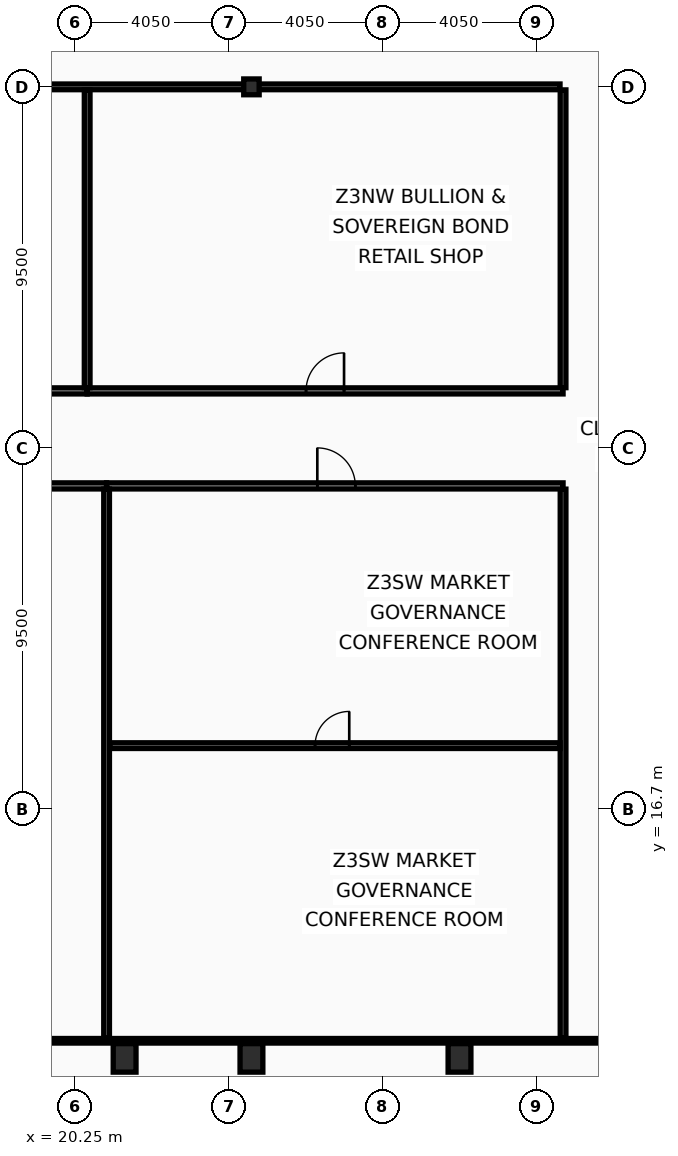
"""IFC4 building model, lengths in metres.
Left out: names, types, materials, properties, quantities, classifications, styles, units other than length and angle.
Written with IfcOpenShell. Run it as: python <this file> out.ifc"""

import sys

from ifc_helpers import new_model, si_unit, direction, frame, frame_2d, origin, origin_2d, place, context, subcontext, project, spatial, rectangle, hollow_rectangle, i_section, extrude, element, fill, save


model = new_model("IFC4")
c1 = context("Model", 3, precision=1e-05, world=origin(), true_north=direction((0.0, 1.0)))
c2 = subcontext(c1, "Body", "Model", "MODEL_VIEW")
j1 = project(units=[si_unit("LENGTHUNIT", "METRE"), si_unit("PLANEANGLEUNIT", "RADIAN")], contexts=[c1])
p1 = place(None, origin())
s1 = spatial("IfcSite", under=j1, at=p1, CompositionType="ELEMENT")
p2 = place(p1, origin())
s2 = spatial("IfcBuilding", under=s1, at=p2, CompositionType="ELEMENT")
p3 = place(p2, frame((0.0, 0.0, 195.8)))
s3 = spatial("IfcBuildingStorey", under=s2, at=p3, CompositionType="ELEMENT", Elevation=195.8)
for number, where, z_axis, x_axis in (
    (1, (21.562, 10.15, 0.0), (0.0, 0.0, 1.0), (1.0, 0.0, 0.0)),
    (2, (24.9, 10.15, 0.0), (0.0, 0.0, 1.0), (1.0, 0.0, 0.0)),
    (3, (30.375, 10.15, 0.0), (0.0, 0.0, 1.0), (1.0, 0.0, 0.0)),
):
    element("IfcColumn", number, at=place(p3, frame(where, z_axis=z_axis, x_axis=x_axis)), inside=s3, PredefinedType="COLUMN", context=c2, shape_type="SweptSolid", body=[
        extrude(hollow_rectangle(XDim=0.6, YDim=0.75, WallThickness=0.045, at=origin_2d()), origin(), (0.0, 0.0, 1.0), 3.6),
    ])
p4 = place(p3, frame((24.9, 35.7, 0.0), z_axis=(0.0, 0.0, 1.0), x_axis=(1.0, 0.0, 0.0)))
e4 = element("IfcColumn", 4, at=p4, inside=s3, PredefinedType="COLUMN", context=c2, shape_type="SweptSolid", body=[
    extrude(i_section(OverallWidth=0.406, OverallDepth=0.416, WebThickness=0.03, FlangeThickness=0.048, at=origin_2d()), origin(), (0.0, 0.0, 1.0), 3.6),
])
p5 = place(p3, frame((33.1, 10.665, 0.0), z_axis=(0.0, 0.0, 1.0), x_axis=(0.0, 1.0, 0.0)))
e5 = element("IfcWall", 5, at=p5, inside=s3, PredefinedType="PARTITIONING", context=c2, shape_type="SweptSolid", body=[
    extrude(rectangle(XDim=14.45, YDim=0.15, at=frame_2d((7.225, 0.0))), origin(), (0.0, 0.0, 1.0), 2.98),
])
p6 = place(p3, frame((33.1, 27.785, 0.0), z_axis=(0.0, 0.0, 1.0), x_axis=(0.0, 1.0, 0.0)))
e6 = element("IfcWall", 6, at=p6, inside=s3, PredefinedType="PARTITIONING", context=c2, shape_type="SweptSolid", body=[
    extrude(rectangle(XDim=7.835, YDim=0.15, at=frame_2d((3.917, 0.0))), origin(), (0.0, 0.0, 1.0), 2.98),
])
p7 = place(p3, frame((8.095, 35.7, 0.0), z_axis=(0.0, 0.0, 1.0), x_axis=(1.0, 0.0, 0.0)))
e7 = element("IfcWall", 7, at=p7, inside=s3, PredefinedType="PARTITIONING", context=c2, shape_type="SweptSolid", body=[
    extrude(rectangle(XDim=24.925, YDim=0.15, at=frame_2d((12.462, 0.0))), origin(), (0.0, 0.0, 1.0), 2.73),
])
p8 = place(p3, frame((12.972, 25.2, 0.0), z_axis=(0.0, 0.0, 1.0), x_axis=(1.0, 0.0, 0.0)))
e8 = element("IfcWall", 8, at=p8, inside=s3, PredefinedType="PARTITIONING", context=c2, shape_type="SweptSolid", body=[
    extrude(rectangle(XDim=8.116, YDim=0.16, at=frame_2d((4.058, 0.0))), origin(), (0.0, 0.0, 1.0), 2.73),
])
p9 = place(p8, frame((3.909, 0.0, 0.0)))
e9 = element("IfcOpeningElement", 9, at=p9, cuts=e8, PredefinedType="OPENING", context=c2, shape_type="SweptSolid", body=[
    extrude(rectangle(XDim=1.0, YDim=2.05, at=frame_2d((0.5, 1.025))), frame((0.0, 0.09, 0.0), z_axis=(0.0, -1.0, 0.0), x_axis=(1.0, 0.0, 0.0)), (0.0, 0.0, 1.0), 0.18),
])
p10 = place(p3, frame((21.088, 25.2, 0.0), z_axis=(0.0, 0.0, 1.0), x_axis=(1.0, 0.0, 0.0)))
e10 = element("IfcWall", 10, at=p10, inside=s3, PredefinedType="PARTITIONING", context=c2, shape_type="SweptSolid", body=[
    extrude(rectangle(XDim=12.012, YDim=0.16, at=frame_2d((6.006, 0.0))), origin(), (0.0, 0.0, 1.0), 2.73),
])
p11 = place(p10, frame((5.545, 0.0, 0.0)))
e11 = element("IfcOpeningElement", 11, at=p11, cuts=e10, PredefinedType="OPENING", context=c2, shape_type="SweptSolid", body=[
    extrude(rectangle(XDim=1.0, YDim=2.05, at=frame_2d((0.5, 1.025))), frame((0.0, 0.09, 0.0), z_axis=(0.0, -1.0, 0.0), x_axis=(1.0, 0.0, 0.0)), (0.0, 0.0, 1.0), 0.18),
])
p12 = place(p3, frame((21.088, 10.665, 0.0), z_axis=(0.0, 0.0, 1.0), x_axis=(0.0, 1.0, 0.0)))
e12 = element("IfcWall", 12, at=p12, inside=s3, PredefinedType="PARTITIONING", context=c2, shape_type="SweptSolid", body=[
    extrude(rectangle(XDim=14.45, YDim=0.15, at=frame_2d((7.225, 0.0))), origin(), (0.0, 0.0, 1.0), 2.98),
])
p13 = place(p3, frame((21.168, 18.366, 0.0), z_axis=(0.0, 0.0, 1.0), x_axis=(1.0, 0.0, 0.0)))
e13 = element("IfcWall", 13, at=p13, inside=s3, PredefinedType="PARTITIONING", context=c2, shape_type="SweptSolid", body=[
    extrude(rectangle(XDim=11.852, YDim=0.15, at=frame_2d((5.926, 0.0))), origin(), (0.0, 0.0, 1.0), 2.73),
])
p14 = place(p13, frame((5.405, 0.0, 0.0)))
e14 = element("IfcOpeningElement", 14, at=p14, cuts=e13, PredefinedType="OPENING", context=c2, shape_type="SweptSolid", body=[
    extrude(rectangle(XDim=0.9, YDim=2.05, at=frame_2d((0.45, 1.025))), frame((0.0, 0.085, 0.0), z_axis=(0.0, -1.0, 0.0), x_axis=(1.0, 0.0, 0.0)), (0.0, 0.0, 1.0), 0.17),
])
p15 = place(p3, frame((8.03, 27.7, 0.0), z_axis=(0.0, 0.0, 1.0), x_axis=(1.0, 0.0, 0.0)))
e15 = element("IfcWall", 15, at=p15, inside=s3, PredefinedType="PARTITIONING", context=c2, shape_type="SweptSolid", body=[
    extrude(rectangle(XDim=12.547, YDim=0.16, at=frame_2d((6.273, 0.0))), origin(), (0.0, 0.0, 1.0), 2.73),
])
p16 = place(p15, frame((5.77, 0.0, 0.0)))
e16 = element("IfcOpeningElement", 16, at=p16, cuts=e15, PredefinedType="OPENING", context=c2, shape_type="SweptSolid", body=[
    extrude(rectangle(XDim=1.0, YDim=2.05, at=frame_2d((0.5, 1.025))), frame((0.0, 0.09, 0.0), z_axis=(0.0, -1.0, 0.0), x_axis=(1.0, 0.0, 0.0)), (0.0, 0.0, 1.0), 0.18),
])
p17 = place(p3, frame((20.577, 27.7, 0.0), z_axis=(0.0, 0.0, 1.0), x_axis=(1.0, 0.0, 0.0)))
e17 = element("IfcWall", 17, at=p17, inside=s3, PredefinedType="PARTITIONING", context=c2, shape_type="SweptSolid", body=[
    extrude(rectangle(XDim=12.523, YDim=0.16, at=frame_2d((6.261, 0.0))), origin(), (0.0, 0.0, 1.0), 2.73),
])
p18 = place(p17, frame((5.76, 0.0, 0.0)))
e18 = element("IfcOpeningElement", 18, at=p18, cuts=e17, PredefinedType="OPENING", context=c2, shape_type="SweptSolid", body=[
    extrude(rectangle(XDim=1.0, YDim=2.05, at=frame_2d((0.5, 1.025))), frame((0.0, 0.09, 0.0), z_axis=(0.0, -1.0, 0.0), x_axis=(1.0, 0.0, 0.0)), (0.0, 0.0, 1.0), 0.18),
])
p19 = place(p3, frame((20.577, 27.785, 0.0), z_axis=(0.0, 0.0, 1.0), x_axis=(0.0, 1.0, 0.0)))
e19 = element("IfcWall", 19, at=p19, inside=s3, PredefinedType="PARTITIONING", context=c2, shape_type="SweptSolid", body=[
    extrude(rectangle(XDim=7.835, YDim=0.15, at=frame_2d((3.917, 0.0))), origin(), (0.0, 0.0, 1.0), 2.98),
])
p20 = place(p3, frame((8.095, 10.6, 0.0), z_axis=(0.0, 0.0, 1.0), x_axis=(1.0, 0.0, 0.0)))
e20 = element("IfcWall", 20, at=p20, inside=s3, PredefinedType="PARTITIONING", context=c2, shape_type="SweptSolid", body=[
    extrude(rectangle(XDim=56.71, YDim=0.12, at=frame_2d((28.355, 0.0))), origin(), (0.0, 0.0, 1.0), 2.73),
])
p21 = place(p11, origin())
e21 = element("IfcDoor", 21, at=p21, inside=s3, OperationType="SINGLE_SWING_LEFT", PredefinedType="DOOR", context=c2, shape_type="SweptSolid", body=[
    extrude(rectangle(XDim=1.0, YDim=2.05, at=frame_2d((0.5, 1.025))), frame((0.0, 0.025, 0.0), z_axis=(0.0, -1.0, 0.0), x_axis=(1.0, 0.0, 0.0)), (0.0, 0.0, 1.0), 0.05),
])
fill(e11, e21)
p22 = place(p14, origin())
e22 = element("IfcDoor", 22, at=p22, inside=s3, OperationType="SINGLE_SWING_RIGHT", PredefinedType="DOOR", context=c2, shape_type="SweptSolid", body=[
    extrude(rectangle(XDim=0.9, YDim=2.05, at=frame_2d((0.45, 1.025))), frame((0.0, 0.025, 0.0), z_axis=(0.0, -1.0, 0.0), x_axis=(1.0, 0.0, 0.0)), (0.0, 0.0, 1.0), 0.05),
])
fill(e14, e22)
p23 = place(p18, origin())
e23 = element("IfcDoor", 23, at=p23, inside=s3, OperationType="SINGLE_SWING_RIGHT", PredefinedType="DOOR", context=c2, shape_type="SweptSolid", body=[
    extrude(rectangle(XDim=1.0, YDim=2.05, at=frame_2d((0.5, 1.025))), frame((0.0, 0.025, 0.0), z_axis=(0.0, -1.0, 0.0), x_axis=(1.0, 0.0, 0.0)), (0.0, 0.0, 1.0), 0.05),
])
fill(e18, e23)
save(model, sys.argv[1])
